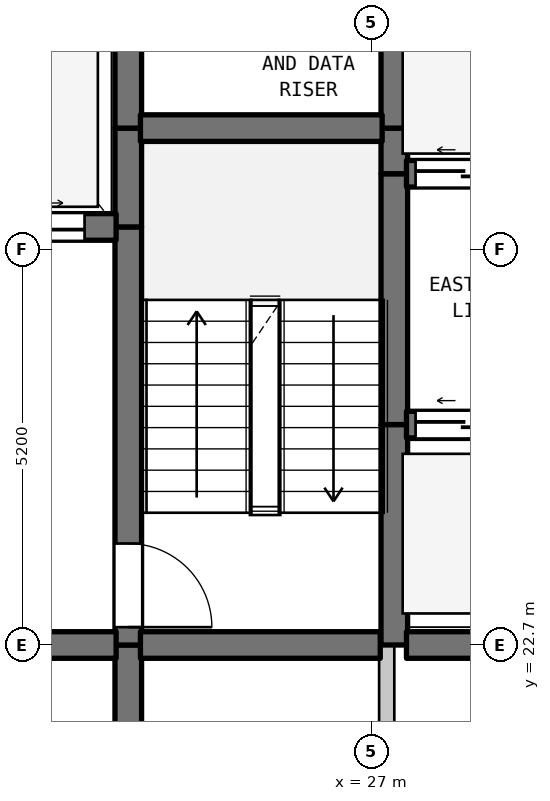
"""IFC4 building model, lengths in metres.
Left out: names, types, materials, properties, quantities, classifications, styles, units other than length and angle.
Written with IfcOpenShell. Run it as: python <this file> out.ifc"""

import sys

from ifc_helpers import new_model, si_unit, direction, frame, frame_2d, origin, place, context, subcontext, project, spatial, rectangle, extrude, element, fill, save


model = new_model("IFC4")
c1 = context("Model", 3, precision=1e-05, world=origin(), true_north=direction((0.0, 1.0)))
c2 = subcontext(c1, "Body", "Model", "MODEL_VIEW")
j1 = project(units=[si_unit("LENGTHUNIT", "METRE"), si_unit("PLANEANGLEUNIT", "RADIAN")], contexts=[c1])
p1 = place(None, origin())
s1 = spatial("IfcSite", under=j1, at=p1, CompositionType="ELEMENT")
p2 = place(p1, origin())
s2 = spatial("IfcBuilding", under=s1, at=p2, CompositionType="ELEMENT")
p3 = place(p2, frame((0.0, 0.0, 77.5)))
s3 = spatial("IfcBuildingStorey", under=s2, at=p3, CompositionType="ELEMENT", Elevation=77.5)
p4 = place(p3, frame((23.8, 19.5, 0.0), z_axis=(0.0, 0.0, 1.0), x_axis=(0.0, 1.0, 0.0)))
e1 = element("IfcWall", 1, at=p4, inside=s3, PredefinedType="SHEAR", context=c2, shape_type="SweptSolid", body=[
    extrude(rectangle(XDim=3.2, YDim=0.35, at=frame_2d((1.6, 0.0))), origin(), (0.0, 0.0, 1.0), 3.28),
])
p5 = place(p3, frame((23.8, 22.7, 0.0), z_axis=(0.0, 0.0, 1.0), x_axis=(0.0, 1.0, 0.0)))
e2 = element("IfcWall", 2, at=p5, inside=s3, PredefinedType="SHEAR", context=c2, shape_type="SweptSolid", body=[
    extrude(rectangle(XDim=5.5, YDim=0.35, at=frame_2d((2.75, 0.0))), origin(), (0.0, 0.0, 1.0), 3.28),
])
p6 = place(p5, frame((0.235, 0.0, 0.0)))
e3 = element("IfcOpeningElement", 3, at=p6, cuts=e2, PredefinedType="OPENING", context=c2, shape_type="SweptSolid", body=[
    extrude(rectangle(XDim=1.1, YDim=2.15, at=frame_2d((0.55, 1.075))), frame((0.0, 0.185, 0.0), z_axis=(0.0, -1.0, 0.0), x_axis=(1.0, 0.0, 0.0)), (0.0, 0.0, 1.0), 0.37),
])
for number, where, z_axis, x_axis in (
    (4, (23.8, 28.2, 0.0), (0.0, 0.0, 1.0), (0.0, 1.0, 0.0)),
    (5, (23.8, 29.5, 0.0), (0.0, 0.0, 1.0), (0.0, 1.0, 0.0)),
):
    element("IfcWall", number, at=place(p3, frame(where, z_axis=z_axis, x_axis=x_axis)), inside=s3, PredefinedType="SHEAR", context=c2, shape_type="SweptSolid", body=[
        extrude(rectangle(XDim=1.3, YDim=0.35, at=frame_2d((0.65, 0.0))), origin(), (0.0, 0.0, 1.0), 3.28),
    ])
p7 = place(p3, frame((27.2, 21.1, 0.0), z_axis=(0.0, 0.0, 1.0), x_axis=(0.0, 1.0, 0.0)))
e6 = element("IfcWall", 6, at=p7, inside=s3, PredefinedType="STANDARD", context=c2, shape_type="SweptSolid", body=[
    extrude(rectangle(XDim=1.6, YDim=0.2, at=frame_2d((0.8, 0.0))), origin(), (0.0, 0.0, 1.0), 3.28),
])
p8 = place(p3, frame((27.3, 22.7, 0.0), z_axis=(0.0, 0.0, 1.0), x_axis=(0.0, 1.0, 0.0)))
e7 = element("IfcWall", 7, at=p8, inside=s3, PredefinedType="SHEAR", context=c2, shape_type="SweptSolid", body=[
    extrude(rectangle(XDim=2.9, YDim=0.35, at=frame_2d((1.45, 0.0))), origin(), (0.0, 0.0, 1.0), 3.28),
])
p9 = place(p3, frame((27.3, 25.6, 0.0), z_axis=(0.0, 0.0, 1.0), x_axis=(0.0, 1.0, 0.0)))
e8 = element("IfcWall", 8, at=p9, inside=s3, PredefinedType="SHEAR", context=c2, shape_type="SweptSolid", body=[
    extrude(rectangle(XDim=3.3, YDim=0.35, at=frame_2d((1.65, 0.0))), origin(), (0.0, 0.0, 1.0), 3.28),
])
p10 = place(p3, frame((27.3, 28.9, 0.0), z_axis=(0.0, 0.0, 1.0), x_axis=(0.0, 1.0, 0.0)))
e9 = element("IfcWall", 9, at=p10, inside=s3, PredefinedType="SHEAR", context=c2, shape_type="SweptSolid", body=[
    extrude(rectangle(XDim=0.6, YDim=0.35, at=frame_2d((0.3, 0.0))), origin(), (0.0, 0.0, 1.0), 3.28),
])
p11 = place(p3, frame((27.3, 29.5, 0.0), z_axis=(0.0, 0.0, 1.0), x_axis=(0.0, 1.0, 0.0)))
e10 = element("IfcWall", 10, at=p11, inside=s3, PredefinedType="SHEAR", context=c2, shape_type="SweptSolid", body=[
    extrude(rectangle(XDim=2.0, YDim=0.35, at=frame_2d((1.0, 0.0))), origin(), (0.0, 0.0, 1.0), 3.28),
])
p12 = place(p3, frame((19.16, 22.7, 0.0), z_axis=(0.0, 0.0, 1.0), x_axis=(1.0, 0.0, 0.0)))
e11 = element("IfcWall", 11, at=p12, inside=s3, PredefinedType="SHEAR", context=c2, shape_type="SweptSolid", body=[
    extrude(rectangle(XDim=4.48, YDim=0.35, at=frame_2d((2.24, 0.0))), origin(), (0.0, 0.0, 1.0), 3.28),
])
p13 = place(p12, frame((1.64, 0.0, 0.0)))
e12 = element("IfcOpeningElement", 12, at=p13, cuts=e11, PredefinedType="OPENING", context=c2, shape_type="SweptSolid", body=[
    extrude(rectangle(XDim=1.2, YDim=2.2, at=frame_2d((0.6, 1.1))), frame((0.0, 0.185, 0.0), z_axis=(0.0, -1.0, 0.0), x_axis=(1.0, 0.0, 0.0)), (0.0, 0.0, 1.0), 0.37),
])
p14 = place(p3, frame((23.96, 22.7, 0.0), z_axis=(0.0, 0.0, 1.0), x_axis=(1.0, 0.0, 0.0)))
e13 = element("IfcWall", 13, at=p14, inside=s3, PredefinedType="SHEAR", context=c2, shape_type="SweptSolid", body=[
    extrude(rectangle(XDim=3.155, YDim=0.35, at=frame_2d((1.578, 0.0))), origin(), (0.0, 0.0, 1.0), 3.28),
])
p15 = place(p3, frame((27.46, 22.7, 0.0), z_axis=(0.0, 0.0, 1.0), x_axis=(1.0, 0.0, 0.0)))
e14 = element("IfcWall", 14, at=p15, inside=s3, PredefinedType="SHEAR", context=c2, shape_type="SweptSolid", body=[
    extrude(rectangle(XDim=3.18, YDim=0.35, at=frame_2d((1.59, 0.0))), origin(), (0.0, 0.0, 1.0), 3.28),
])
p16 = place(p3, frame((27.46, 25.6, 0.0), z_axis=(0.0, 0.0, 1.0), x_axis=(1.0, 0.0, 0.0)))
e15 = element("IfcWall", 15, at=p16, inside=s3, PredefinedType="SHEAR", context=c2, shape_type="SweptSolid", body=[
    extrude(rectangle(XDim=3.18, YDim=0.35, at=frame_2d((1.59, 0.0))), origin(), (0.0, 0.0, 1.0), 3.28),
])
p17 = place(p16, frame((0.12, 0.0, 0.0)))
e16 = element("IfcOpeningElement", 16, at=p17, cuts=e15, PredefinedType="OPENING", context=c2, shape_type="SweptSolid", body=[
    extrude(rectangle(XDim=1.25, YDim=2.2, at=frame_2d((0.625, 1.1))), frame((0.0, 0.185, 0.0), z_axis=(0.0, -1.0, 0.0), x_axis=(1.0, 0.0, 0.0)), (0.0, 0.0, 1.0), 0.37),
])
p18 = place(p16, frame((1.81, 0.0, 0.0)))
e17 = element("IfcOpeningElement", 17, at=p18, cuts=e15, PredefinedType="OPENING", context=c2, shape_type="SweptSolid", body=[
    extrude(rectangle(XDim=1.25, YDim=2.2, at=frame_2d((0.625, 1.1))), frame((0.0, 0.185, 0.0), z_axis=(0.0, -1.0, 0.0), x_axis=(1.0, 0.0, 0.0)), (0.0, 0.0, 1.0), 0.37),
])
p19 = place(p3, frame((19.16, 28.2, 0.0), z_axis=(0.0, 0.0, 1.0), x_axis=(1.0, 0.0, 0.0)))
e18 = element("IfcWall", 18, at=p19, inside=s3, PredefinedType="SHEAR", context=c2, shape_type="SweptSolid", body=[
    extrude(rectangle(XDim=4.48, YDim=0.35, at=frame_2d((2.24, 0.0))), origin(), (0.0, 0.0, 1.0), 3.28),
])
p20 = place(p19, frame((0.415, 0.0, 0.0)))
e19 = element("IfcOpeningElement", 19, at=p20, cuts=e18, PredefinedType="OPENING", context=c2, shape_type="SweptSolid", body=[
    extrude(rectangle(XDim=1.25, YDim=2.2, at=frame_2d((0.625, 1.1))), frame((0.0, 0.185, 0.0), z_axis=(0.0, -1.0, 0.0), x_axis=(1.0, 0.0, 0.0)), (0.0, 0.0, 1.0), 0.37),
])
p21 = place(p19, frame((2.815, 0.0, 0.0)))
e20 = element("IfcOpeningElement", 20, at=p21, cuts=e18, PredefinedType="OPENING", context=c2, shape_type="SweptSolid", body=[
    extrude(rectangle(XDim=1.25, YDim=2.2, at=frame_2d((0.625, 1.1))), frame((0.0, 0.185, 0.0), z_axis=(0.0, -1.0, 0.0), x_axis=(1.0, 0.0, 0.0)), (0.0, 0.0, 1.0), 0.37),
])
p22 = place(p3, frame((27.46, 28.9, 0.0), z_axis=(0.0, 0.0, 1.0), x_axis=(1.0, 0.0, 0.0)))
e21 = element("IfcWall", 21, at=p22, inside=s3, PredefinedType="SHEAR", context=c2, shape_type="SweptSolid", body=[
    extrude(rectangle(XDim=3.18, YDim=0.35, at=frame_2d((1.59, 0.0))), origin(), (0.0, 0.0, 1.0), 3.28),
])
p23 = place(p22, frame((0.12, 0.0, 0.0)))
e22 = element("IfcOpeningElement", 22, at=p23, cuts=e21, PredefinedType="OPENING", context=c2, shape_type="SweptSolid", body=[
    extrude(rectangle(XDim=1.25, YDim=2.2, at=frame_2d((0.625, 1.1))), frame((0.0, 0.185, 0.0), z_axis=(0.0, -1.0, 0.0), x_axis=(1.0, 0.0, 0.0)), (0.0, 0.0, 1.0), 0.37),
])
p24 = place(p22, frame((1.81, 0.0, 0.0)))
e23 = element("IfcOpeningElement", 23, at=p24, cuts=e21, PredefinedType="OPENING", context=c2, shape_type="SweptSolid", body=[
    extrude(rectangle(XDim=1.25, YDim=2.2, at=frame_2d((0.625, 1.1))), frame((0.0, 0.185, 0.0), z_axis=(0.0, -1.0, 0.0), x_axis=(1.0, 0.0, 0.0)), (0.0, 0.0, 1.0), 0.37),
])
p25 = place(p3, frame((23.96, 29.5, 0.0), z_axis=(0.0, 0.0, 1.0), x_axis=(1.0, 0.0, 0.0)))
e24 = element("IfcWall", 24, at=p25, inside=s3, PredefinedType="SHEAR", context=c2, shape_type="SweptSolid", body=[
    extrude(rectangle(XDim=3.18, YDim=0.35, at=frame_2d((1.59, 0.0))), origin(), (0.0, 0.0, 1.0), 3.28),
])
p26 = place(p6, frame((1.1, 0.0, 0.0), z_axis=(0.0, 0.0, 1.0), x_axis=(-1.0, 0.0, 0.0)))
e25 = element("IfcDoor", 25, at=p26, inside=s3, OperationType="SINGLE_SWING_LEFT", PredefinedType="DOOR", context=c2, shape_type="SweptSolid", body=[
    extrude(rectangle(XDim=1.1, YDim=2.15, at=frame_2d((0.55, 1.075))), frame((0.0, 0.025, 0.0), z_axis=(0.0, -1.0, 0.0), x_axis=(1.0, 0.0, 0.0)), (0.0, 0.0, 1.0), 0.05),
])
fill(e3, e25)
p27 = place(p17, origin())
e26 = element("IfcDoor", 26, at=p27, inside=s3, OperationType="DOUBLE_DOOR_SLIDING", PredefinedType="DOOR", context=c2, shape_type="SweptSolid", body=[
    extrude(rectangle(XDim=1.25, YDim=2.2, at=frame_2d((0.625, 1.1))), frame((0.0, 0.025, 0.0), z_axis=(0.0, -1.0, 0.0), x_axis=(1.0, 0.0, 0.0)), (0.0, 0.0, 1.0), 0.05),
])
fill(e16, e26)
p28 = place(p21, origin())
e27 = element("IfcDoor", 27, at=p28, inside=s3, OperationType="DOUBLE_DOOR_SLIDING", PredefinedType="DOOR", context=c2, shape_type="SweptSolid", body=[
    extrude(rectangle(XDim=1.25, YDim=2.2, at=frame_2d((0.625, 1.1))), frame((0.0, 0.025, 0.0), z_axis=(0.0, -1.0, 0.0), x_axis=(1.0, 0.0, 0.0)), (0.0, 0.0, 1.0), 0.05),
])
fill(e20, e27)
p29 = place(p23, origin())
e28 = element("IfcDoor", 28, at=p29, inside=s3, OperationType="DOUBLE_DOOR_SLIDING", PredefinedType="DOOR", context=c2, shape_type="SweptSolid", body=[
    extrude(rectangle(XDim=1.25, YDim=2.2, at=frame_2d((0.625, 1.1))), frame((0.0, 0.025, 0.0), z_axis=(0.0, -1.0, 0.0), x_axis=(1.0, 0.0, 0.0)), (0.0, 0.0, 1.0), 0.05),
])
fill(e22, e28)
save(model, sys.argv[1])
